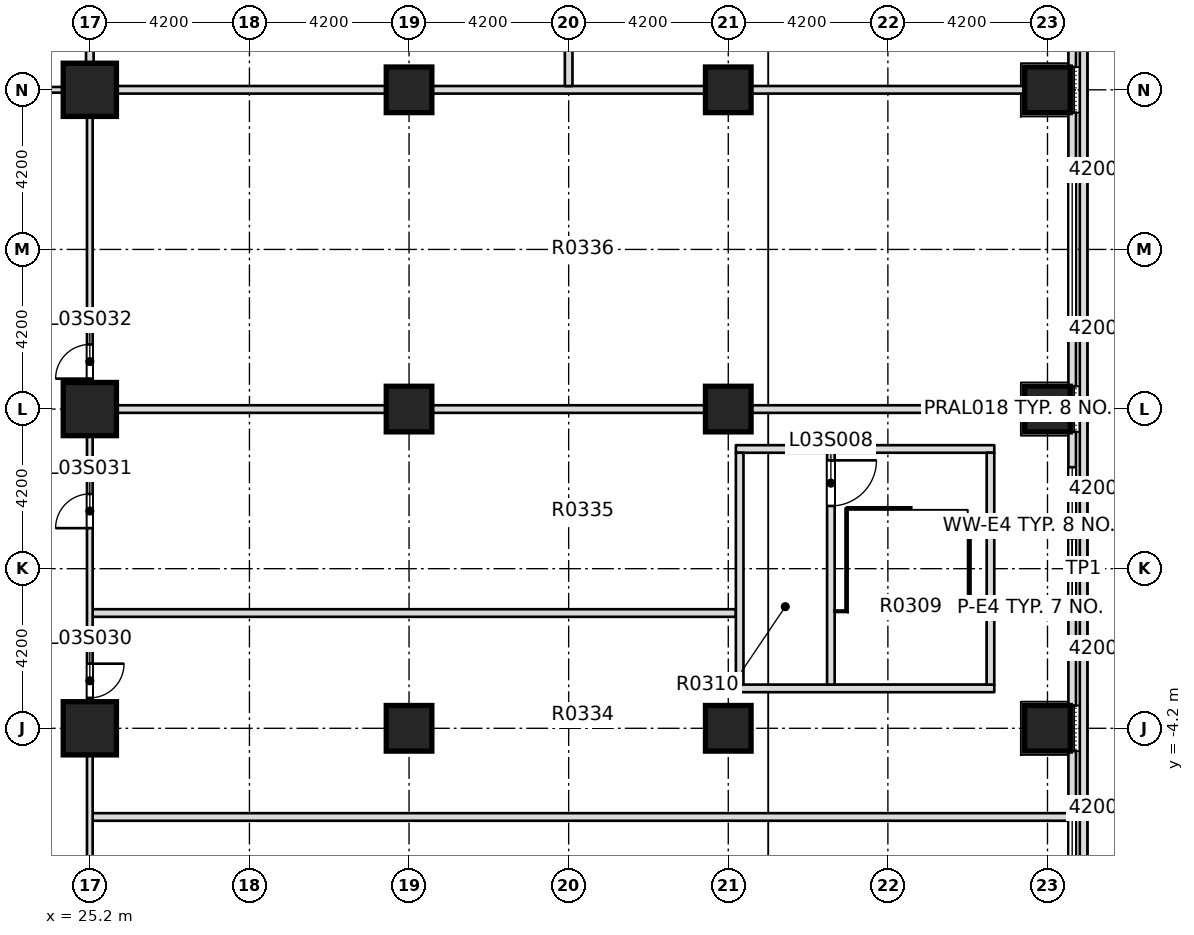
"""IFC4 building model, lengths in metres.
Left out: names, types, materials, properties, quantities, classifications, styles, units other than length and angle.
Written with IfcOpenShell. Run it as: python <this file> out.ifc"""

import sys

from ifc_helpers import new_model, si_unit, direction, frame, frame_2d, origin, origin_2d, place, context, subcontext, project, spatial, rectangle, extrude, element, fill, save


model = new_model("IFC4")
c1 = context("Model", 3, precision=1e-05, world=origin(), true_north=direction((0.0, 1.0)))
c2 = subcontext(c1, "Body", "Model", "MODEL_VIEW")
j1 = project(units=[si_unit("LENGTHUNIT", "METRE"), si_unit("PLANEANGLEUNIT", "RADIAN")], contexts=[c1])
p1 = place(None, origin())
s1 = spatial("IfcSite", under=j1, at=p1, CompositionType="ELEMENT")
p2 = place(p1, origin())
s2 = spatial("IfcBuilding", under=s1, at=p2, CompositionType="ELEMENT")
p3 = place(p2, frame((0.0, 0.0, 20.0)))
s3 = spatial("IfcBuildingStorey", under=s2, at=p3, CompositionType="ELEMENT", Elevation=20.0)
for number, where, z_axis, x_axis in (
    (1, (25.2, -4.2, -0.4), (0.0, 0.0, 1.0), (1.0, 0.0, 0.0)),
    (2, (25.2, 4.2, -0.4), (0.0, 0.0, 1.0), (1.0, 0.0, 0.0)),
    (3, (25.2, 12.6, -0.4), (0.0, 0.0, 1.0), (1.0, 0.0, 0.0)),
):
    element("IfcColumn", number, at=place(p3, frame(where, z_axis=z_axis, x_axis=x_axis)), inside=s3, PredefinedType="COLUMN", context=c2, shape_type="SweptSolid", body=[
        extrude(rectangle(XDim=1.4, YDim=1.4, at=origin_2d()), origin(), (0.0, 0.0, 1.0), 5.0),
    ])
for number, where, z_axis, x_axis in (
    (4, (33.6, -4.2, -0.4), (0.0, 0.0, 1.0), (1.0, 0.0, 0.0)),
    (5, (42.0, -4.2, -0.4), (0.0, 0.0, 1.0), (1.0, 0.0, 0.0)),
):
    element("IfcColumn", number, at=place(p3, frame(where, z_axis=z_axis, x_axis=x_axis)), inside=s3, PredefinedType="COLUMN", context=c2, shape_type="SweptSolid", body=[
        extrude(rectangle(XDim=1.2, YDim=1.2, at=origin_2d()), origin(), (0.0, 0.0, 1.0), 5.4),
    ])
p4 = place(p3, frame((50.4, -4.2, 0.0), z_axis=(0.0, 0.0, 1.0), x_axis=(1.0, 0.0, 0.0)))
e6 = element("IfcColumn", 6, at=p4, inside=s3, PredefinedType="COLUMN", context=c2, shape_type="SweptSolid", body=[
    extrude(rectangle(XDim=1.2, YDim=1.2, at=origin_2d()), origin(), (0.0, 0.0, 1.0), 4.6),
])
for number, where, z_axis, x_axis in (
    (7, (33.6, 4.2, -0.4), (0.0, 0.0, 1.0), (1.0, 0.0, 0.0)),
    (8, (42.0, 4.2, -0.4), (0.0, 0.0, 1.0), (1.0, 0.0, 0.0)),
):
    element("IfcColumn", number, at=place(p3, frame(where, z_axis=z_axis, x_axis=x_axis)), inside=s3, PredefinedType="COLUMN", context=c2, shape_type="SweptSolid", body=[
        extrude(rectangle(XDim=1.2, YDim=1.2, at=origin_2d()), origin(), (0.0, 0.0, 1.0), 5.4),
    ])
p5 = place(p3, frame((50.4, 4.2, 0.0), z_axis=(0.0, 0.0, 1.0), x_axis=(1.0, 0.0, 0.0)))
e9 = element("IfcColumn", 9, at=p5, inside=s3, PredefinedType="COLUMN", context=c2, shape_type="SweptSolid", body=[
    extrude(rectangle(XDim=1.2, YDim=1.2, at=origin_2d()), origin(), (0.0, 0.0, 1.0), 4.6),
])
for number, where, z_axis, x_axis in (
    (10, (33.6, 12.6, -0.4), (0.0, 0.0, 1.0), (1.0, 0.0, 0.0)),
    (11, (42.0, 12.6, -0.4), (0.0, 0.0, 1.0), (1.0, 0.0, 0.0)),
):
    element("IfcColumn", number, at=place(p3, frame(where, z_axis=z_axis, x_axis=x_axis)), inside=s3, PredefinedType="COLUMN", context=c2, shape_type="SweptSolid", body=[
        extrude(rectangle(XDim=1.2, YDim=1.2, at=origin_2d()), origin(), (0.0, 0.0, 1.0), 5.4),
    ])
p6 = place(p3, frame((50.4, 12.6, 0.0), z_axis=(0.0, 0.0, 1.0), x_axis=(1.0, 0.0, 0.0)))
e12 = element("IfcColumn", 12, at=p6, inside=s3, PredefinedType="COLUMN", context=c2, shape_type="SweptSolid", body=[
    extrude(rectangle(XDim=1.2, YDim=1.2, at=origin_2d()), origin(), (0.0, 0.0, 1.0), 4.6),
])
p7 = place(p3, frame((51.35, -30.25, 5.0), z_axis=(0.0, 0.0, 1.0), x_axis=(0.0, 1.0, 0.0)))
e13 = element("IfcWall", 13, at=p7, inside=s3, PredefinedType="PARAPET", context=c2, shape_type="SweptSolid", body=[
    extrude(rectangle(XDim=60.5, YDim=0.2, at=frame_2d((30.25, 0.0))), origin(), (0.0, 0.0, 1.0), 1.2),
])
p8 = place(p3, frame((25.275, -6.533, 0.0), z_axis=(0.0, 0.0, 1.0), x_axis=(1.0, 0.0, 0.0)))
e14 = element("IfcWall", 14, at=p8, inside=s3, PredefinedType="PARTITIONING", context=c2, shape_type="SweptSolid", body=[
    extrude(rectangle(XDim=25.675, YDim=0.2, at=frame_2d((12.837, 0.0))), origin(), (0.0, 0.0, 1.0), 4.6),
])
p9 = place(p3, frame((42.2, -3.15, 0.0), z_axis=(0.0, 0.0, 1.0), x_axis=(1.0, 0.0, 0.0)))
e15 = element("IfcWall", 15, at=p9, inside=s3, PredefinedType="PARTITIONING", context=c2, shape_type="SweptSolid", body=[
    extrude(rectangle(XDim=6.8, YDim=0.2, at=frame_2d((3.4, 0.0))), origin(), (0.0, 0.0, 1.0), 4.6),
])
p10 = place(p3, frame((25.275, -1.167, 0.0), z_axis=(0.0, 0.0, 1.0), x_axis=(1.0, 0.0, 0.0)))
e16 = element("IfcWall", 16, at=p10, inside=s3, PredefinedType="PARTITIONING", context=c2, shape_type="SweptSolid", body=[
    extrude(rectangle(XDim=16.925, YDim=0.2, at=frame_2d((8.462, 0.0))), origin(), (0.0, 0.0, 1.0), 4.6),
])
p11 = place(p3, frame((49.0, -1.167, 0.0), z_axis=(0.0, 0.0, 1.0), x_axis=(1.0, 0.0, 0.0)))
e17 = element("IfcWall", 17, at=p11, inside=s3, PredefinedType="PARTITIONING", context=c2, shape_type="SweptSolid", body=[
    extrude(rectangle(XDim=1.95, YDim=0.2, at=frame_2d((0.975, 0.0))), origin(), (0.0, 0.0, 1.0), 4.6),
])
p12 = place(p3, frame((42.2, 3.15, 0.0), z_axis=(0.0, 0.0, 1.0), x_axis=(1.0, 0.0, 0.0)))
e18 = element("IfcWall", 18, at=p12, inside=s3, PredefinedType="PARTITIONING", context=c2, shape_type="SweptSolid", body=[
    extrude(rectangle(XDim=6.8, YDim=0.2, at=frame_2d((3.4, 0.0))), origin(), (0.0, 0.0, 1.0), 4.6),
])
p13 = place(p3, frame((25.275, 4.2, 0.0), z_axis=(0.0, 0.0, 1.0), x_axis=(1.0, 0.0, 0.0)))
e19 = element("IfcWall", 19, at=p13, inside=s3, PredefinedType="PARTITIONING", context=c2, shape_type="SweptSolid", body=[
    extrude(rectangle(XDim=25.675, YDim=0.2, at=frame_2d((12.837, 0.0))), origin(), (0.0, 0.0, 1.0), 4.6),
])
p14 = place(p3, frame((16.725, 12.6, 0.0), z_axis=(0.0, 0.0, 1.0), x_axis=(1.0, 0.0, 0.0)))
e20 = element("IfcWall", 20, at=p14, inside=s3, PredefinedType="PARTITIONING", context=c2, shape_type="SweptSolid", body=[
    extrude(rectangle(XDim=8.575, YDim=0.15, at=frame_2d((4.288, 0.0))), origin(), (0.0, 0.0, 1.0), 4.6),
])
p15 = place(p3, frame((25.1, 12.6, 0.0), z_axis=(0.0, 0.0, 1.0), x_axis=(1.0, 0.0, 0.0)))
e21 = element("IfcWall", 21, at=p15, inside=s3, PredefinedType="PARTITIONING", context=c2, shape_type="SweptSolid", body=[
    extrude(rectangle(XDim=25.85, YDim=0.2, at=frame_2d((12.925, 0.0))), origin(), (0.0, 0.0, 1.0), 4.6),
])
p16 = place(p3, frame((25.2, -11.8, 0.0), z_axis=(0.0, 0.0, 1.0), x_axis=(0.0, 1.0, 0.0)))
e22 = element("IfcWall", 22, at=p16, inside=s3, PredefinedType="PARTITIONING", context=c2, shape_type="SweptSolid", body=[
    extrude(rectangle(XDim=24.3, YDim=0.15, at=frame_2d((12.15, 0.0))), origin(), (0.0, 0.0, 1.0), 4.6),
])
p17 = place(p16, frame((2.184, 0.0, 0.0)))
e23 = element("IfcOpeningElement", 23, at=p17, cuts=e22, PredefinedType="OPENING", context=c2, shape_type="SweptSolid", body=[
    extrude(rectangle(XDim=0.9, YDim=2.1, at=frame_2d((0.45, 1.05))), frame((0.0, 0.085, 0.0), z_axis=(0.0, -1.0, 0.0), x_axis=(1.0, 0.0, 0.0)), (0.0, 0.0, 1.0), 0.17),
])
p18 = place(p16, frame((8.4, 0.0, 0.0)))
e24 = element("IfcOpeningElement", 24, at=p18, cuts=e22, PredefinedType="OPENING", context=c2, shape_type="SweptSolid", body=[
    extrude(rectangle(XDim=0.9, YDim=2.1, at=frame_2d((0.45, 1.05))), frame((0.0, 0.085, 0.0), z_axis=(0.0, -1.0, 0.0), x_axis=(1.0, 0.0, 0.0)), (0.0, 0.0, 1.0), 0.17),
])
p19 = place(p16, frame((12.866, 0.0, 0.0)))
e25 = element("IfcOpeningElement", 25, at=p19, cuts=e22, PredefinedType="OPENING", context=c2, shape_type="SweptSolid", body=[
    extrude(rectangle(XDim=0.9, YDim=2.1, at=frame_2d((0.45, 1.05))), frame((0.0, 0.085, 0.0), z_axis=(0.0, -1.0, 0.0), x_axis=(1.0, 0.0, 0.0)), (0.0, 0.0, 1.0), 0.17),
])
p20 = place(p16, frame((16.8, 0.0, 0.0)))
e26 = element("IfcOpeningElement", 26, at=p20, cuts=e22, PredefinedType="OPENING", context=c2, shape_type="SweptSolid", body=[
    extrude(rectangle(XDim=0.9, YDim=2.1, at=frame_2d((0.45, 1.05))), frame((0.0, 0.085, 0.0), z_axis=(0.0, -1.0, 0.0), x_axis=(1.0, 0.0, 0.0)), (0.0, 0.0, 1.0), 0.17),
])
p21 = place(p3, frame((25.2, 12.7, 0.0), z_axis=(0.0, 0.0, 1.0), x_axis=(0.0, 1.0, 0.0)))
e27 = element("IfcWall", 27, at=p21, inside=s3, PredefinedType="PARTITIONING", context=c2, shape_type="SweptSolid", body=[
    extrude(rectangle(XDim=8.975, YDim=0.2, at=frame_2d((4.488, 0.0))), origin(), (0.0, 0.0, 1.0), 4.6),
])
p22 = place(p3, frame((37.8, 12.7, 0.0), z_axis=(0.0, 0.0, 1.0), x_axis=(0.0, 1.0, 0.0)))
e28 = element("IfcWall", 28, at=p22, inside=s3, PredefinedType="PARTITIONING", context=c2, shape_type="SweptSolid", body=[
    extrude(rectangle(XDim=8.525, YDim=0.2, at=frame_2d((4.263, 0.0))), origin(), (0.0, 0.0, 1.0), 4.6),
])
p23 = place(p3, frame((42.3, -3.05, 0.0), z_axis=(0.0, 0.0, 1.0), x_axis=(0.0, 1.0, 0.0)))
e29 = element("IfcWall", 29, at=p23, inside=s3, PredefinedType="PARTITIONING", context=c2, shape_type="SweptSolid", body=[
    extrude(rectangle(XDim=6.1, YDim=0.2, at=frame_2d((3.05, 0.0))), origin(), (0.0, 0.0, 1.0), 4.6),
])
p24 = place(p3, frame((44.7, -3.05, 0.0), z_axis=(0.0, 0.0, 1.0), x_axis=(0.0, 1.0, 0.0)))
e30 = element("IfcWall", 30, at=p24, inside=s3, PredefinedType="PARTITIONING", context=c2, shape_type="SweptSolid", body=[
    extrude(rectangle(XDim=6.1, YDim=0.2, at=frame_2d((3.05, 0.0))), origin(), (0.0, 0.0, 1.0), 4.6),
])
p25 = place(p24, frame((4.7, 0.0, 0.0)))
e31 = element("IfcOpeningElement", 31, at=p25, cuts=e30, PredefinedType="OPENING", context=c2, shape_type="SweptSolid", body=[
    extrude(rectangle(XDim=1.2, YDim=2.1, at=frame_2d((0.6, 1.05))), frame((0.0, 0.11, 0.0), z_axis=(0.0, -1.0, 0.0), x_axis=(1.0, 0.0, 0.0)), (0.0, 0.0, 1.0), 0.22),
])
p26 = place(p3, frame((48.9, -3.05, 0.0), z_axis=(0.0, 0.0, 1.0), x_axis=(0.0, 1.0, 0.0)))
e32 = element("IfcWall", 32, at=p26, inside=s3, PredefinedType="PARTITIONING", context=c2, shape_type="SweptSolid", body=[
    extrude(rectangle(XDim=6.1, YDim=0.2, at=frame_2d((3.05, 0.0))), origin(), (0.0, 0.0, 1.0), 4.6),
])
p27 = place(p3, frame((51.05, -12.0, 0.0), z_axis=(0.0, 0.0, 1.0), x_axis=(0.0, 1.0, 0.0)))
e33 = element("IfcWall", 33, at=p27, inside=s3, PredefinedType="STANDARD", context=c2, shape_type="SweptSolid", body=[
    extrude(rectangle(XDim=7.2, YDim=0.2, at=frame_2d((3.6, 0.0))), origin(), (0.0, 0.0, 1.0), 4.6),
])
p28 = place(p27, frame((1.8, 0.0, 0.9)))
e34 = element("IfcOpeningElement", 34, at=p28, cuts=e33, PredefinedType="OPENING", context=c2, shape_type="SweptSolid", body=[
    extrude(rectangle(XDim=3.6, YDim=2.8, at=frame_2d((1.8, 1.4))), frame((0.0, 0.11, 0.0), z_axis=(0.0, -1.0, 0.0), x_axis=(1.0, 0.0, 0.0)), (0.0, 0.0, 1.0), 0.22),
])
p29 = place(p3, frame((51.05, -3.6, 0.0), z_axis=(0.0, 0.0, 1.0), x_axis=(0.0, 1.0, 0.0)))
e35 = element("IfcWall", 35, at=p29, inside=s3, PredefinedType="STANDARD", context=c2, shape_type="SweptSolid", body=[
    extrude(rectangle(XDim=7.2, YDim=0.2, at=frame_2d((3.6, 0.0))), origin(), (0.0, 0.0, 1.0), 4.6),
])
p30 = place(p29, frame((2.67, 0.0, 0.9)))
e36 = element("IfcOpeningElement", 36, at=p30, cuts=e35, PredefinedType="OPENING", context=c2, shape_type="SweptSolid", body=[
    extrude(rectangle(XDim=3.6, YDim=2.8, at=frame_2d((1.8, 1.4))), frame((0.0, 0.11, 0.0), z_axis=(0.0, -1.0, 0.0), x_axis=(1.0, 0.0, 0.0)), (0.0, 0.0, 1.0), 0.22),
])
p31 = place(p3, frame((51.05, 4.8, 0.0), z_axis=(0.0, 0.0, 1.0), x_axis=(0.0, 1.0, 0.0)))
e37 = element("IfcWall", 37, at=p31, inside=s3, PredefinedType="STANDARD", context=c2, shape_type="SweptSolid", body=[
    extrude(rectangle(XDim=7.2, YDim=0.2, at=frame_2d((3.6, 0.0))), origin(), (0.0, 0.0, 1.0), 4.6),
])
p32 = place(p31, frame((1.8, 0.0, 0.9)))
e38 = element("IfcOpeningElement", 38, at=p32, cuts=e37, PredefinedType="OPENING", context=c2, shape_type="SweptSolid", body=[
    extrude(rectangle(XDim=3.6, YDim=2.8, at=frame_2d((1.8, 1.4))), frame((0.0, 0.11, 0.0), z_axis=(0.0, -1.0, 0.0), x_axis=(1.0, 0.0, 0.0)), (0.0, 0.0, 1.0), 0.22),
])
p33 = place(p3, frame((51.05, 13.2, 0.0), z_axis=(0.0, 0.0, 1.0), x_axis=(0.0, 1.0, 0.0)))
e39 = element("IfcWall", 39, at=p33, inside=s3, PredefinedType="STANDARD", context=c2, shape_type="SweptSolid", body=[
    extrude(rectangle(XDim=7.2, YDim=0.2, at=frame_2d((3.6, 0.0))), origin(), (0.0, 0.0, 1.0), 4.6),
])
p34 = place(p33, frame((1.8, 0.0, 0.9)))
e40 = element("IfcOpeningElement", 40, at=p34, cuts=e39, PredefinedType="OPENING", context=c2, shape_type="SweptSolid", body=[
    extrude(rectangle(XDim=3.6, YDim=2.8, at=frame_2d((1.8, 1.4))), frame((0.0, 0.11, 0.0), z_axis=(0.0, -1.0, 0.0), x_axis=(1.0, 0.0, 0.0)), (0.0, 0.0, 1.0), 0.22),
])
p35 = place(p25, origin())
e41 = element("IfcDoor", 41, at=p35, inside=s3, OperationType="DOUBLE_DOOR_SINGLE_SWING", PredefinedType="DOOR", context=c2, shape_type="SweptSolid", body=[
    extrude(rectangle(XDim=1.2, YDim=2.1, at=frame_2d((0.6, 1.05))), frame((0.0, 0.025, 0.0), z_axis=(0.0, -1.0, 0.0), x_axis=(1.0, 0.0, 0.0)), (0.0, 0.0, 1.0), 0.05),
])
fill(e31, e41)
p36 = place(p18, origin())
e42 = element("IfcDoor", 42, at=p36, inside=s3, OperationType="SINGLE_SWING_LEFT", PredefinedType="DOOR", context=c2, shape_type="SweptSolid", body=[
    extrude(rectangle(XDim=0.9, YDim=2.1, at=frame_2d((0.45, 1.05))), frame((0.0, 0.025, 0.0), z_axis=(0.0, -1.0, 0.0), x_axis=(1.0, 0.0, 0.0)), (0.0, 0.0, 1.0), 0.05),
])
fill(e24, e42)
p37 = place(p19, origin())
e43 = element("IfcDoor", 43, at=p37, inside=s3, OperationType="SINGLE_SWING_RIGHT", PredefinedType="DOOR", context=c2, shape_type="SweptSolid", body=[
    extrude(rectangle(XDim=0.9, YDim=2.1, at=frame_2d((0.45, 1.05))), frame((0.0, 0.025, 0.0), z_axis=(0.0, -1.0, 0.0), x_axis=(1.0, 0.0, 0.0)), (0.0, 0.0, 1.0), 0.05),
])
fill(e25, e43)
p38 = place(p20, origin())
e44 = element("IfcDoor", 44, at=p38, inside=s3, OperationType="SINGLE_SWING_LEFT", PredefinedType="DOOR", context=c2, shape_type="SweptSolid", body=[
    extrude(rectangle(XDim=0.9, YDim=2.1, at=frame_2d((0.45, 1.05))), frame((0.0, 0.025, 0.0), z_axis=(0.0, -1.0, 0.0), x_axis=(1.0, 0.0, 0.0)), (0.0, 0.0, 1.0), 0.05),
])
fill(e26, e44)
p39 = place(p28, origin())
e45 = element("IfcWindow", 45, at=p39, inside=s3, PartitioningType="SINGLE_PANEL", PredefinedType="WINDOW", context=c2, shape_type="SweptSolid", body=[
    extrude(rectangle(XDim=3.6, YDim=2.8, at=frame_2d((1.8, 1.4))), frame((0.0, 0.03, 0.0), z_axis=(0.0, -1.0, 0.0), x_axis=(1.0, 0.0, 0.0)), (0.0, 0.0, 1.0), 0.06),
])
fill(e34, e45)
p40 = place(p30, origin())
e46 = element("IfcWindow", 46, at=p40, inside=s3, PartitioningType="SINGLE_PANEL", PredefinedType="WINDOW", context=c2, shape_type="SweptSolid", body=[
    extrude(rectangle(XDim=3.6, YDim=2.8, at=frame_2d((1.8, 1.4))), frame((0.0, 0.03, 0.0), z_axis=(0.0, -1.0, 0.0), x_axis=(1.0, 0.0, 0.0)), (0.0, 0.0, 1.0), 0.06),
])
fill(e36, e46)
p41 = place(p32, origin())
e47 = element("IfcWindow", 47, at=p41, inside=s3, PartitioningType="SINGLE_PANEL", PredefinedType="WINDOW", context=c2, shape_type="SweptSolid", body=[
    extrude(rectangle(XDim=3.6, YDim=2.8, at=frame_2d((1.8, 1.4))), frame((0.0, 0.03, 0.0), z_axis=(0.0, -1.0, 0.0), x_axis=(1.0, 0.0, 0.0)), (0.0, 0.0, 1.0), 0.06),
])
fill(e38, e47)
save(model, sys.argv[1])
